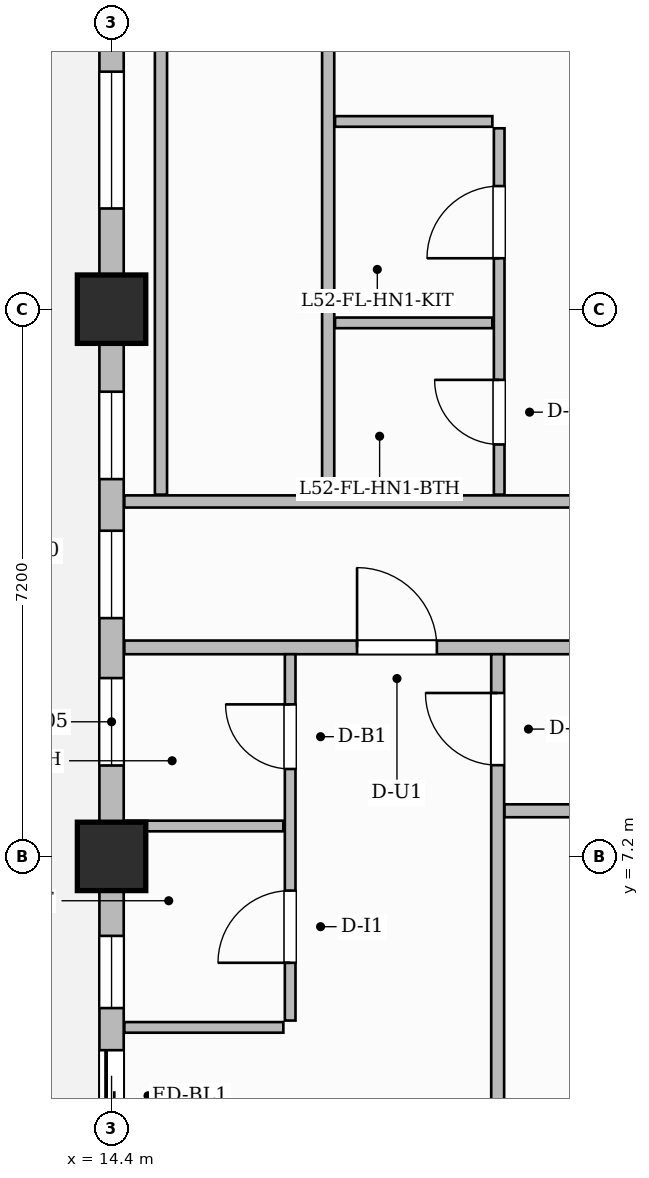
"""IFC4 building model, lengths in metres.
Left out: names, types, materials, properties, quantities, classifications, styles, units other than length and angle.
Written with IfcOpenShell. Run it as: python <this file> out.ifc"""

import sys

from ifc_helpers import new_model, si_unit, direction, frame, frame_2d, origin, origin_2d, place, context, subcontext, project, spatial, rectangle, extrude, source, transform, mapped, element, fill, save


model = new_model("IFC4")
c1 = context("Model", 3, precision=1e-05, world=origin(), true_north=direction((0.0, 1.0)))
c2 = subcontext(c1, "Body", "Model", "MODEL_VIEW")
j1 = project(units=[si_unit("LENGTHUNIT", "METRE"), si_unit("PLANEANGLEUNIT", "RADIAN")], contexts=[c1])
p1 = place(None, origin())
s1 = spatial("IfcSite", under=j1, at=p1, CompositionType="ELEMENT")
p2 = place(p1, origin())
s2 = spatial("IfcBuilding", under=s1, at=p2, CompositionType="ELEMENT")
p3 = place(p2, frame((0.0, 0.0, 209.6)))
s3 = spatial("IfcBuildingStorey", under=s2, at=p3, CompositionType="ELEMENT", Elevation=209.6)
m1 = source(origin(), c2, "Body", "SweptSolid", [
    extrude(rectangle(XDim=0.9, YDim=0.9, at=origin_2d()), origin(), (0.0, 0.0, 1.0), 3.85),
])
for number, where, z_axis, x_axis in (
    (1, (14.4, 7.2, 0.0), (0.0, 0.0, 1.0), (1.0, 0.0, 0.0)),
    (2, (14.4, 14.4, 0.0), (0.0, 0.0, 1.0), (1.0, 0.0, 0.0)),
):
    element("IfcColumn", number, at=place(p3, frame(where, z_axis=z_axis, x_axis=x_axis)), inside=s3, PredefinedType="COLUMN", context=c2, shape_type="MappedRepresentation", body=[
        mapped(m1, transform((0.0, 0.0, 0.0), scale=1.0)),
    ])
p4 = place(p3, frame((14.568, 9.95, 0.0), z_axis=(0.0, 0.0, 1.0), x_axis=(1.0, 0.0, 0.0)))
e3 = element("IfcWall", 3, at=p4, inside=s3, PredefinedType="PARTITIONING", context=c2, shape_type="SweptSolid", body=[
    extrude(rectangle(XDim=15.542, YDim=0.18, at=frame_2d((7.771, 0.0))), origin(), (0.0, 0.0, 1.0), 3.6),
])
p5 = place(p4, frame((3.062, 0.0, 0.0)))
e4 = element("IfcOpeningElement", 4, at=p5, cuts=e3, PredefinedType="OPENING", context=c2, shape_type="SweptSolid", body=[
    extrude(rectangle(XDim=1.05, YDim=2.25, at=frame_2d((0.525, 1.125))), frame((0.0, 0.1, 0.0), z_axis=(0.0, -1.0, 0.0), x_axis=(1.0, 0.0, 0.0)), (0.0, 0.0, 1.0), 0.2),
])
p6 = place(p3, frame((14.568, 11.87, 0.0), z_axis=(0.0, 0.0, 1.0), x_axis=(1.0, 0.0, 0.0)))
e5 = element("IfcWall", 5, at=p6, inside=s3, PredefinedType="PARTITIONING", context=c2, shape_type="SweptSolid", body=[
    extrude(rectangle(XDim=15.542, YDim=0.16, at=frame_2d((7.771, 0.0))), origin(), (0.0, 0.0, 1.0), 3.6),
])
p7 = place(p6, frame((6.557, 0.0, 0.0)))
e6 = element("IfcOpeningElement", 6, at=p7, cuts=e5, PredefinedType="OPENING", context=c2, shape_type="SweptSolid", body=[
    extrude(rectangle(XDim=1.05, YDim=2.25, at=frame_2d((0.525, 1.125))), frame((0.0, 0.09, 0.0), z_axis=(0.0, -1.0, 0.0), x_axis=(1.0, 0.0, 0.0)), (0.0, 0.0, 1.0), 0.18),
])
p8 = place(p3, frame((16.75, 5.04, 0.0), z_axis=(0.0, 0.0, 1.0), x_axis=(0.0, 1.0, 0.0)))
e7 = element("IfcWall", 7, at=p8, inside=s3, PredefinedType="PARTITIONING", context=c2, shape_type="SweptSolid", body=[
    extrude(rectangle(XDim=4.82, YDim=0.14, at=frame_2d((2.41, 0.0))), origin(), (0.0, 0.0, 1.0), 3.6),
])
p9 = place(p8, frame((0.76, 0.0, 0.0)))
e8 = element("IfcOpeningElement", 8, at=p9, cuts=e7, PredefinedType="OPENING", context=c2, shape_type="SweptSolid", body=[
    extrude(rectangle(XDim=0.95, YDim=2.15, at=frame_2d((0.475, 1.075))), frame((0.0, 0.08, 0.0), z_axis=(0.0, -1.0, 0.0), x_axis=(1.0, 0.0, 0.0)), (0.0, 0.0, 1.0), 0.16),
])
p10 = place(p8, frame((3.31, 0.0, 0.0)))
e9 = element("IfcOpeningElement", 9, at=p10, cuts=e7, PredefinedType="OPENING", context=c2, shape_type="SweptSolid", body=[
    extrude(rectangle(XDim=0.85, YDim=2.1, at=frame_2d((0.425, 1.05))), frame((0.0, 0.08, 0.0), z_axis=(0.0, -1.0, 0.0), x_axis=(1.0, 0.0, 0.0)), (0.0, 0.0, 1.0), 0.16),
])
p11 = place(p3, frame((14.59, 7.6, 0.0), z_axis=(0.0, 0.0, 1.0), x_axis=(1.0, 0.0, 0.0)))
e10 = element("IfcWall", 10, at=p11, inside=s3, PredefinedType="PARTITIONING", context=c2, shape_type="SweptSolid", body=[
    extrude(rectangle(XDim=2.07, YDim=0.14, at=frame_2d((1.035, 0.0))), origin(), (0.0, 0.0, 1.0), 3.6),
])
p12 = place(p3, frame((14.568, 4.95, 0.0), z_axis=(0.0, 0.0, 1.0), x_axis=(1.0, 0.0, 0.0)))
e11 = element("IfcWall", 11, at=p12, inside=s3, PredefinedType="PARTITIONING", context=c2, shape_type="SweptSolid", body=[
    extrude(rectangle(XDim=2.092, YDim=0.14, at=frame_2d((1.046, 0.0))), origin(), (0.0, 0.0, 1.0), 3.6),
])
p13 = place(p3, frame((19.48, 0.168, 0.0), z_axis=(0.0, 0.0, 1.0), x_axis=(0.0, 1.0, 0.0)))
e12 = element("IfcWall", 12, at=p13, inside=s3, PredefinedType="PARTITIONING", context=c2, shape_type="SweptSolid", body=[
    extrude(rectangle(XDim=9.692, YDim=0.17, at=frame_2d((4.846, 0.0))), origin(), (0.0, 0.0, 1.0), 3.6),
])
p14 = place(p13, frame((8.232, 0.0, 0.0)))
e13 = element("IfcOpeningElement", 13, at=p14, cuts=e12, PredefinedType="OPENING", context=c2, shape_type="SweptSolid", body=[
    extrude(rectangle(XDim=0.95, YDim=2.15, at=frame_2d((0.475, 1.075))), frame((0.0, 0.095, 0.0), z_axis=(0.0, -1.0, 0.0), x_axis=(1.0, 0.0, 0.0)), (0.0, 0.0, 1.0), 0.19),
])
p15 = place(p3, frame((19.57, 7.8, 0.0), z_axis=(0.0, 0.0, 1.0), x_axis=(1.0, 0.0, 0.0)))
e14 = element("IfcWall", 14, at=p15, inside=s3, PredefinedType="PARTITIONING", context=c2, shape_type="SweptSolid", body=[
    extrude(rectangle(XDim=10.54, YDim=0.17, at=frame_2d((5.27, 0.0))), origin(), (0.0, 0.0, 1.0), 3.6),
])
p16 = place(p15, frame((2.646, 0.0, 0.0)))
e15 = element("IfcOpeningElement", 15, at=p16, cuts=e14, PredefinedType="OPENING", context=c2, shape_type="SweptSolid", body=[
    extrude(rectangle(XDim=0.95, YDim=2.15, at=frame_2d((0.475, 1.075))), frame((0.0, 0.095, 0.0), z_axis=(0.0, -1.0, 0.0), x_axis=(1.0, 0.0, 0.0)), (0.0, 0.0, 1.0), 0.19),
])
p17 = place(p15, frame((4.865, 0.0, 0.0)))
e16 = element("IfcOpeningElement", 16, at=p17, cuts=e14, PredefinedType="OPENING", context=c2, shape_type="SweptSolid", body=[
    extrude(rectangle(XDim=0.95, YDim=2.15, at=frame_2d((0.475, 1.075))), frame((0.0, 0.095, 0.0), z_axis=(0.0, -1.0, 0.0), x_axis=(1.0, 0.0, 0.0)), (0.0, 0.0, 1.0), 0.19),
])
p18 = place(p15, frame((7.055, 0.0, 0.0)))
e17 = element("IfcOpeningElement", 17, at=p18, cuts=e14, PredefinedType="OPENING", context=c2, shape_type="SweptSolid", body=[
    extrude(rectangle(XDim=0.95, YDim=2.15, at=frame_2d((0.475, 1.075))), frame((0.0, 0.095, 0.0), z_axis=(0.0, -1.0, 0.0), x_axis=(1.0, 0.0, 0.0)), (0.0, 0.0, 1.0), 0.19),
])
for number, where, z_axis, x_axis in (
    (18, (15.05, 11.96, 0.0), (0.0, 0.0, 1.0), (0.0, 1.0, 0.0)),
    (19, (17.25, 11.96, 0.0), (0.0, 0.0, 1.0), (0.0, 1.0, 0.0)),
):
    element("IfcWall", number, at=place(p3, frame(where, z_axis=z_axis, x_axis=x_axis)), inside=s3, PredefinedType="PARTITIONING", context=c2, shape_type="SweptSolid", body=[
        extrude(rectangle(XDim=13.15, YDim=0.16, at=frame_2d((6.575, 0.0))), origin(), (0.0, 0.0, 1.0), 3.6),
    ])
p19 = place(p3, frame((19.5, 11.96, 0.0), z_axis=(0.0, 0.0, 1.0), x_axis=(0.0, 1.0, 0.0)))
e20 = element("IfcWall", 20, at=p19, inside=s3, PredefinedType="PARTITIONING", context=c2, shape_type="SweptSolid", body=[
    extrude(rectangle(XDim=4.82, YDim=0.14, at=frame_2d((2.41, 0.0))), origin(), (0.0, 0.0, 1.0), 3.6),
])
p20 = place(p19, frame((0.66, 0.0, 0.0)))
e21 = element("IfcOpeningElement", 21, at=p20, cuts=e20, PredefinedType="OPENING", context=c2, shape_type="SweptSolid", body=[
    extrude(rectangle(XDim=0.85, YDim=2.1, at=frame_2d((0.425, 1.05))), frame((0.0, 0.08, 0.0), z_axis=(0.0, -1.0, 0.0), x_axis=(1.0, 0.0, 0.0)), (0.0, 0.0, 1.0), 0.16),
])
p21 = place(p19, frame((3.11, 0.0, 0.0)))
e22 = element("IfcOpeningElement", 22, at=p21, cuts=e20, PredefinedType="OPENING", context=c2, shape_type="SweptSolid", body=[
    extrude(rectangle(XDim=0.95, YDim=2.15, at=frame_2d((0.475, 1.075))), frame((0.0, 0.08, 0.0), z_axis=(0.0, -1.0, 0.0), x_axis=(1.0, 0.0, 0.0)), (0.0, 0.0, 1.0), 0.16),
])
p22 = place(p3, frame((17.34, 14.22, 0.0), z_axis=(0.0, 0.0, 1.0), x_axis=(1.0, 0.0, 0.0)))
e23 = element("IfcWall", 23, at=p22, inside=s3, PredefinedType="PARTITIONING", context=c2, shape_type="SweptSolid", body=[
    extrude(rectangle(XDim=2.07, YDim=0.14, at=frame_2d((1.035, 0.0))), origin(), (0.0, 0.0, 1.0), 3.085),
])
p23 = place(p3, frame((17.34, 16.87, 0.0), z_axis=(0.0, 0.0, 1.0), x_axis=(1.0, 0.0, 0.0)))
e24 = element("IfcWall", 24, at=p23, inside=s3, PredefinedType="PARTITIONING", context=c2, shape_type="SweptSolid", body=[
    extrude(rectangle(XDim=2.07, YDim=0.14, at=frame_2d((1.035, 0.0))), origin(), (0.0, 0.0, 1.0), 3.6),
])
p24 = place(p3, frame((14.4, 0.05, 0.0), z_axis=(0.0, 0.0, 1.0), x_axis=(0.0, 1.0, 0.0)))
e25 = element("IfcWall", 25, at=p24, inside=s3, PredefinedType="SOLIDWALL", context=c2, shape_type="SweptSolid", body=[
    extrude(rectangle(XDim=25.1, YDim=0.32, at=frame_2d((12.55, 0.0))), origin(), (0.0, 0.0, 1.0), 3.085),
])
p25 = place(p24, frame((3.4, 0.0, 0.0)))
e26 = element("IfcOpeningElement", 26, at=p25, cuts=e25, PredefinedType="OPENING", context=c2, shape_type="SweptSolid", body=[
    extrude(rectangle(XDim=1.2, YDim=2.2, at=frame_2d((0.6, 1.1))), frame((0.0, 0.17, 0.0), z_axis=(0.0, -1.0, 0.0), x_axis=(1.0, 0.0, 0.0)), (0.0, 0.0, 1.0), 0.34),
])
p26 = place(p24, frame((1.225, 0.0, 0.8)))
e27 = element("IfcOpeningElement", 27, at=p26, cuts=e25, PredefinedType="OPENING", context=c2, shape_type="SweptSolid", body=[
    extrude(rectangle(XDim=1.4, YDim=1.85, at=frame_2d((0.7, 0.925))), frame((0.0, 0.17, 0.0), z_axis=(0.0, -1.0, 0.0), x_axis=(1.0, 0.0, 0.0)), (0.0, 0.0, 1.0), 0.34),
])
p27 = place(p24, frame((5.154, 0.0, 0.8)))
e28 = element("IfcOpeningElement", 28, at=p27, cuts=e25, PredefinedType="OPENING", context=c2, shape_type="SweptSolid", body=[
    extrude(rectangle(XDim=0.95, YDim=1.75, at=frame_2d((0.475, 0.875))), frame((0.0, 0.17, 0.0), z_axis=(0.0, -1.0, 0.0), x_axis=(1.0, 0.0, 0.0)), (0.0, 0.0, 1.0), 0.34),
])
p28 = place(p24, frame((8.346, 0.0, 0.8)))
e29 = element("IfcOpeningElement", 29, at=p28, cuts=e25, PredefinedType="OPENING", context=c2, shape_type="SweptSolid", body=[
    extrude(rectangle(XDim=1.15, YDim=1.8, at=frame_2d((0.575, 0.9))), frame((0.0, 0.17, 0.0), z_axis=(0.0, -1.0, 0.0), x_axis=(1.0, 0.0, 0.0)), (0.0, 0.0, 1.0), 0.34),
])
p29 = place(p24, frame((10.285, 0.0, 0.8)))
e30 = element("IfcOpeningElement", 30, at=p29, cuts=e25, PredefinedType="OPENING", context=c2, shape_type="SweptSolid", body=[
    extrude(rectangle(XDim=1.15, YDim=1.8, at=frame_2d((0.575, 0.9))), frame((0.0, 0.17, 0.0), z_axis=(0.0, -1.0, 0.0), x_axis=(1.0, 0.0, 0.0)), (0.0, 0.0, 1.0), 0.34),
])
p30 = place(p24, frame((12.114, 0.0, 0.8)))
e31 = element("IfcOpeningElement", 31, at=p30, cuts=e25, PredefinedType="OPENING", context=c2, shape_type="SweptSolid", body=[
    extrude(rectangle(XDim=1.15, YDim=1.8, at=frame_2d((0.575, 0.9))), frame((0.0, 0.17, 0.0), z_axis=(0.0, -1.0, 0.0), x_axis=(1.0, 0.0, 0.0)), (0.0, 0.0, 1.0), 0.34),
])
p31 = place(p24, frame((15.675, 0.0, 0.8)))
e32 = element("IfcOpeningElement", 32, at=p31, cuts=e25, PredefinedType="OPENING", context=c2, shape_type="SweptSolid", body=[
    extrude(rectangle(XDim=1.8, YDim=1.85, at=frame_2d((0.9, 0.925))), frame((0.0, 0.17, 0.0), z_axis=(0.0, -1.0, 0.0), x_axis=(1.0, 0.0, 0.0)), (0.0, 0.0, 1.0), 0.34),
])
p32 = place(p24, frame((18.425, 0.0, 0.8)))
e33 = element("IfcOpeningElement", 33, at=p32, cuts=e25, PredefinedType="OPENING", context=c2, shape_type="SweptSolid", body=[
    extrude(rectangle(XDim=1.8, YDim=1.85, at=frame_2d((0.9, 0.925))), frame((0.0, 0.17, 0.0), z_axis=(0.0, -1.0, 0.0), x_axis=(1.0, 0.0, 0.0)), (0.0, 0.0, 1.0), 0.34),
])
p33 = place(p24, frame((22.65, 0.0, 0.8)))
e34 = element("IfcOpeningElement", 34, at=p33, cuts=e25, PredefinedType="OPENING", context=c2, shape_type="SweptSolid", body=[
    extrude(rectangle(XDim=1.4, YDim=1.85, at=frame_2d((0.7, 0.925))), frame((0.0, 0.17, 0.0), z_axis=(0.0, -1.0, 0.0), x_axis=(1.0, 0.0, 0.0)), (0.0, 0.0, 1.0), 0.34),
])
m2 = source(origin(), c2, "Body", "SweptSolid", [
    extrude(rectangle(XDim=0.95, YDim=2.15, at=frame_2d((0.475, 1.075))), frame((0.0, 0.025, 0.0), z_axis=(0.0, -1.0, 0.0), x_axis=(1.0, 0.0, 0.0)), (0.0, 0.0, 1.0), 0.05),
])
p34 = place(p9, origin())
e35 = element("IfcDoor", 35, at=p34, inside=s3, OperationType="SINGLE_SWING_LEFT", PredefinedType="DOOR", context=c2, shape_type="MappedRepresentation", body=[
    mapped(m2, transform((0.0, 0.0, 0.0), scale=1.0)),
])
fill(e8, e35)
m3 = source(origin(), c2, "Body", "SweptSolid", [
    extrude(rectangle(XDim=0.85, YDim=2.1, at=frame_2d((0.425, 1.05))), frame((0.0, 0.025, 0.0), z_axis=(0.0, -1.0, 0.0), x_axis=(1.0, 0.0, 0.0)), (0.0, 0.0, 1.0), 0.05),
])
p35 = place(p10, origin())
e36 = element("IfcDoor", 36, at=p35, inside=s3, OperationType="SINGLE_SWING_RIGHT", PredefinedType="DOOR", context=c2, shape_type="MappedRepresentation", body=[
    mapped(m3, transform((0.0, 0.0, 0.0), scale=1.0)),
])
fill(e9, e36)
m4 = source(origin(), c2, "Body", "SweptSolid", [
    extrude(rectangle(XDim=1.05, YDim=2.25, at=frame_2d((0.525, 1.125))), frame((0.0, 0.025, 0.0), z_axis=(0.0, -1.0, 0.0), x_axis=(1.0, 0.0, 0.0)), (0.0, 0.0, 1.0), 0.05),
])
p36 = place(p5, origin())
e37 = element("IfcDoor", 37, at=p36, inside=s3, OperationType="SINGLE_SWING_LEFT", PredefinedType="DOOR", context=c2, shape_type="MappedRepresentation", body=[
    mapped(m4, transform((0.0, 0.0, 0.0), scale=1.0)),
])
fill(e4, e37)
p37 = place(p14, origin())
e38 = element("IfcDoor", 38, at=p37, inside=s3, OperationType="SINGLE_SWING_RIGHT", PredefinedType="DOOR", context=c2, shape_type="MappedRepresentation", body=[
    mapped(m2, transform((0.0, 0.0, 0.0), scale=1.0)),
])
fill(e13, e38)
p38 = place(p20, origin())
e39 = element("IfcDoor", 39, at=p38, inside=s3, OperationType="SINGLE_SWING_RIGHT", PredefinedType="DOOR", context=c2, shape_type="MappedRepresentation", body=[
    mapped(m3, transform((0.0, 0.0, 0.0), scale=1.0)),
])
fill(e21, e39)
p39 = place(p21, origin())
e40 = element("IfcDoor", 40, at=p39, inside=s3, OperationType="SINGLE_SWING_LEFT", PredefinedType="DOOR", context=c2, shape_type="MappedRepresentation", body=[
    mapped(m2, transform((0.0, 0.0, 0.0), scale=1.0)),
])
fill(e22, e40)
m5 = source(origin(), c2, "Body", "SweptSolid", [
    extrude(rectangle(XDim=1.2, YDim=2.2, at=frame_2d((0.6, 1.1))), frame((0.0, 0.025, 0.0), z_axis=(0.0, -1.0, 0.0), x_axis=(1.0, 0.0, 0.0)), (0.0, 0.0, 1.0), 0.05),
])
p40 = place(p25, origin())
e41 = element("IfcDoor", 41, at=p40, inside=s3, OperationType="SLIDING_TO_LEFT", PredefinedType="DOOR", context=c2, shape_type="MappedRepresentation", body=[
    mapped(m5, transform((0.0, 0.0, 0.0), scale=1.0)),
])
fill(e26, e41)
m6 = source(origin(), c2, "Body", "SweptSolid", [
    extrude(rectangle(XDim=0.95, YDim=1.75, at=frame_2d((0.475, 0.875))), frame((0.0, 0.03, 0.0), z_axis=(0.0, -1.0, 0.0), x_axis=(1.0, 0.0, 0.0)), (0.0, 0.0, 1.0), 0.06),
])
p41 = place(p27, origin())
e42 = element("IfcWindow", 42, at=p41, inside=s3, PartitioningType="SINGLE_PANEL", PredefinedType="WINDOW", context=c2, shape_type="MappedRepresentation", body=[
    mapped(m6, transform((0.0, 0.0, 0.0), scale=1.0)),
])
fill(e28, e42)
m7 = source(origin(), c2, "Body", "SweptSolid", [
    extrude(rectangle(XDim=1.15, YDim=1.8, at=frame_2d((0.575, 0.9))), frame((0.0, 0.03, 0.0), z_axis=(0.0, -1.0, 0.0), x_axis=(1.0, 0.0, 0.0)), (0.0, 0.0, 1.0), 0.06),
])
p42 = place(p28, origin())
e43 = element("IfcWindow", 43, at=p42, inside=s3, PartitioningType="SINGLE_PANEL", PredefinedType="WINDOW", context=c2, shape_type="MappedRepresentation", body=[
    mapped(m7, transform((0.0, 0.0, 0.0), scale=1.0)),
])
fill(e29, e43)
p43 = place(p29, origin())
e44 = element("IfcWindow", 44, at=p43, inside=s3, PartitioningType="SINGLE_PANEL", PredefinedType="WINDOW", context=c2, shape_type="MappedRepresentation", body=[
    mapped(m7, transform((0.0, 0.0, 0.0), scale=1.0)),
])
fill(e30, e44)
p44 = place(p30, origin())
e45 = element("IfcWindow", 45, at=p44, inside=s3, PartitioningType="SINGLE_PANEL", PredefinedType="WINDOW", context=c2, shape_type="MappedRepresentation", body=[
    mapped(m7, transform((0.0, 0.0, 0.0), scale=1.0)),
])
fill(e31, e45)
m8 = source(origin(), c2, "Body", "SweptSolid", [
    extrude(rectangle(XDim=1.8, YDim=1.85, at=frame_2d((0.9, 0.925))), frame((0.0, 0.03, 0.0), z_axis=(0.0, -1.0, 0.0), x_axis=(1.0, 0.0, 0.0)), (0.0, 0.0, 1.0), 0.06),
])
p45 = place(p31, origin())
e46 = element("IfcWindow", 46, at=p45, inside=s3, PartitioningType="DOUBLE_PANEL_VERTICAL", PredefinedType="WINDOW", context=c2, shape_type="MappedRepresentation", body=[
    mapped(m8, transform((0.0, 0.0, 0.0), scale=1.0)),
])
fill(e32, e46)
save(model, sys.argv[1])
